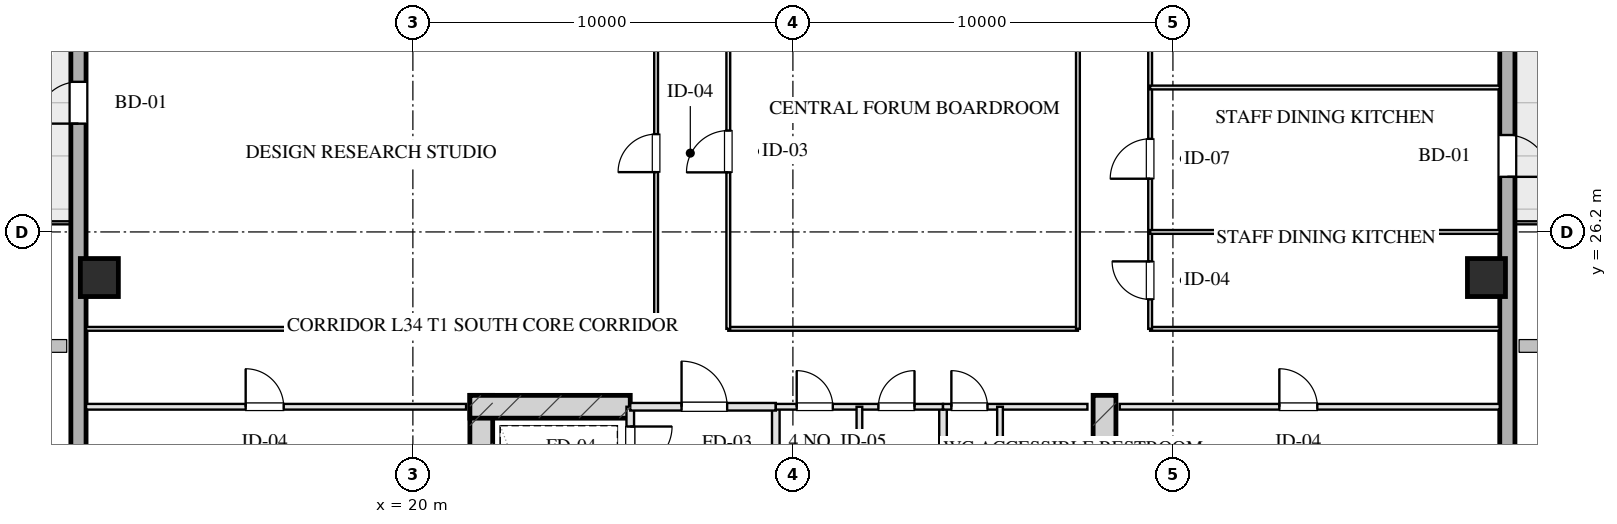
"""IFC4 building model, lengths in metres.
Left out: names, types, materials, properties, quantities, classifications, styles, units other than length and angle.
Written with IfcOpenShell. Run it as: python <this file> out.ifc"""

import sys

from ifc_helpers import new_model, si_unit, direction, frame, frame_2d, origin, origin_2d, place, context, subcontext, project, spatial, rectangle, hollow_rectangle, extrude, element, fill, save


model = new_model("IFC4")
c1 = context("Model", 3, precision=1e-05, world=origin(), true_north=direction((0.0, 1.0)))
c2 = subcontext(c1, "Body", "Model", "MODEL_VIEW")
j1 = project(units=[si_unit("LENGTHUNIT", "METRE"), si_unit("PLANEANGLEUNIT", "RADIAN")], contexts=[c1])
p1 = place(None, origin())
s1 = spatial("IfcSite", under=j1, at=p1, CompositionType="ELEMENT")
p2 = place(p1, origin())
s2 = spatial("IfcBuilding", under=s1, at=p2, CompositionType="ELEMENT")
p3 = place(p2, frame((0.0, 0.0, 131.1)))
s3 = spatial("IfcBuildingStorey", under=s2, at=p3, CompositionType="ELEMENT", Elevation=131.1)
for number, where, z_axis, x_axis in (
    (1, (21.8, 21.9, 0.0), (0.0, 0.0, 1.0), (0.0, -1.0, 0.0)),
    (2, (38.2, 21.9, 0.0), (0.0, 0.0, 1.0), (0.0, -1.0, 0.0)),
):
    element("IfcWall", number, at=place(p3, frame(where, z_axis=z_axis, x_axis=x_axis)), inside=s3, PredefinedType="SHEAR", context=c2, shape_type="SweptSolid", body=[
        extrude(rectangle(XDim=9.48, YDim=0.6, at=frame_2d((4.74, 0.0))), origin(), (0.0, 0.0, 1.0), 3.45),
    ])
p4 = place(p3, frame((21.5, 21.6, 0.0), z_axis=(0.0, 0.0, 1.0), x_axis=(1.0, 0.0, 0.0)))
e3 = element("IfcWall", 3, at=p4, inside=s3, PredefinedType="SHEAR", context=c2, shape_type="SweptSolid", body=[
    extrude(rectangle(XDim=4.22, YDim=0.6, at=frame_2d((2.11, 0.0))), origin(), (0.0, 0.0, 1.0), 3.45),
])
for number, where, z_axis, x_axis in (
    (4, (11.75, 25.0, 0.0), (0.0, 0.0, 1.0), (1.0, 0.0, 0.0)),
    (5, (48.25, 25.0, 0.0), (0.0, 0.0, 1.0), (1.0, 0.0, 0.0)),
):
    element("IfcColumn", number, at=place(p3, frame(where, z_axis=z_axis, x_axis=x_axis)), inside=s3, PredefinedType="COLUMN", context=c2, shape_type="SweptSolid", body=[
        extrude(hollow_rectangle(XDim=1.0, YDim=1.0, WallThickness=0.036, at=origin_2d()), origin(), (0.0, 0.0, 1.0), 3.451),
    ])
p5 = place(p3, frame((11.2, 9.0, 0.0), z_axis=(0.0, 0.0, 1.0), x_axis=(0.0, 1.0, 0.0)))
e6 = element("IfcWall", 6, at=p5, inside=s3, PredefinedType="SOLIDWALL", context=c2, shape_type="SweptSolid", body=[
    extrude(rectangle(XDim=50.0, YDim=0.4, at=frame_2d((25.0, 0.0))), origin(), (0.0, 0.0, 1.0), 2.61),
])
p6 = place(p5, frame((26.475, 0.0, 0.75)))
e7 = element("IfcOpeningElement", 7, at=p6, cuts=e6, PredefinedType="OPENING", context=c2, shape_type="SweptSolid", body=[
    extrude(rectangle(XDim=2.25, YDim=1.46, at=frame_2d((1.125, 0.73))), frame((0.0, 0.21, 0.0), z_axis=(0.0, -1.0, 0.0), x_axis=(1.0, 0.0, 0.0)), (0.0, 0.0, 1.0), 0.42),
])
p7 = place(p5, frame((30.275, 0.0, 0.75)))
e8 = element("IfcOpeningElement", 8, at=p7, cuts=e6, PredefinedType="OPENING", context=c2, shape_type="SweptSolid", body=[
    extrude(rectangle(XDim=2.25, YDim=1.46, at=frame_2d((1.125, 0.73))), frame((0.0, 0.21, 0.0), z_axis=(0.0, -1.0, 0.0), x_axis=(1.0, 0.0, 0.0)), (0.0, 0.0, 1.0), 0.42),
])
p8 = place(p5, frame((20.05, 0.0, 0.0)))
e9 = element("IfcOpeningElement", 9, at=p8, cuts=e6, PredefinedType="OPENING", context=c2, shape_type="SweptSolid", body=[
    extrude(rectangle(XDim=1.1, YDim=2.15, at=frame_2d((0.55, 1.075))), frame((0.0, 0.21, 0.0), z_axis=(0.0, -1.0, 0.0), x_axis=(1.0, 0.0, 0.0)), (0.0, 0.0, 1.0), 0.42),
])
p9 = place(p3, frame((48.8, 59.0, 0.0), z_axis=(0.0, 0.0, 1.0), x_axis=(0.0, -1.0, 0.0)))
e10 = element("IfcWall", 10, at=p9, inside=s3, PredefinedType="SOLIDWALL", context=c2, shape_type="SweptSolid", body=[
    extrude(rectangle(XDim=50.0, YDim=0.4, at=frame_2d((25.0, 0.0))), origin(), (0.0, 0.0, 1.0), 2.61),
])
p10 = place(p9, frame((21.275, 0.0, 0.75)))
e11 = element("IfcOpeningElement", 11, at=p10, cuts=e10, PredefinedType="OPENING", context=c2, shape_type="SweptSolid", body=[
    extrude(rectangle(XDim=2.25, YDim=1.46, at=frame_2d((1.125, 0.73))), frame((0.0, 0.21, 0.0), z_axis=(0.0, -1.0, 0.0), x_axis=(1.0, 0.0, 0.0)), (0.0, 0.0, 1.0), 0.42),
])
p11 = place(p9, frame((17.475, 0.0, 0.75)))
e12 = element("IfcOpeningElement", 12, at=p11, cuts=e10, PredefinedType="OPENING", context=c2, shape_type="SweptSolid", body=[
    extrude(rectangle(XDim=2.25, YDim=1.46, at=frame_2d((1.125, 0.73))), frame((0.0, 0.21, 0.0), z_axis=(0.0, -1.0, 0.0), x_axis=(1.0, 0.0, 0.0)), (0.0, 0.0, 1.0), 0.42),
])
p12 = place(p9, frame((30.25, 0.0, 0.0)))
e13 = element("IfcOpeningElement", 13, at=p12, cuts=e10, PredefinedType="OPENING", context=c2, shape_type="SweptSolid", body=[
    extrude(rectangle(XDim=1.1, YDim=2.15, at=frame_2d((0.55, 1.075))), frame((0.0, 0.21, 0.0), z_axis=(0.0, -1.0, 0.0), x_axis=(1.0, 0.0, 0.0)), (0.0, 0.0, 1.0), 0.42),
])
p13 = place(p3, frame((25.72, 21.6, 0.0), z_axis=(0.0, 0.0, 1.0), x_axis=(0.0, -1.0, 0.0)))
e14 = element("IfcWall", 14, at=p13, inside=s3, PredefinedType="PARTITIONING", context=c2, shape_type="SweptSolid", body=[
    extrude(rectangle(XDim=1.9, YDim=0.2, at=frame_2d((0.95, 0.0))), origin(), (0.0, 0.0, 1.0), 3.175),
])
p14 = place(p13, frame((0.52, 0.0, 0.0)))
e15 = element("IfcOpeningElement", 15, at=p14, cuts=e14, PredefinedType="OPENING", context=c2, shape_type="SweptSolid", body=[
    extrude(rectangle(XDim=1.1, YDim=2.05, at=frame_2d((0.55, 1.025))), frame((0.0, 0.11, 0.0), z_axis=(0.0, -1.0, 0.0), x_axis=(1.0, 0.0, 0.0)), (0.0, 0.0, 1.0), 0.22),
])
p15 = place(p3, frame((29.55, 21.6, 0.0), z_axis=(0.0, 0.0, 1.0), x_axis=(0.0, -1.0, 0.0)))
e16 = element("IfcWall", 16, at=p15, inside=s3, PredefinedType="PARTITIONING", context=c2, shape_type="SweptSolid", body=[
    extrude(rectangle(XDim=8.43, YDim=0.2, at=frame_2d((4.215, 0.0))), origin(), (0.0, 0.0, 1.0), 3.175),
])
p16 = place(p3, frame((25.72, 21.6, 0.0), z_axis=(0.0, 0.0, 1.0), x_axis=(1.0, 0.0, 0.0)))
e17 = element("IfcWall", 17, at=p16, inside=s3, PredefinedType="PARTITIONING", context=c2, shape_type="SweptSolid", body=[
    extrude(rectangle(XDim=3.83, YDim=0.2, at=frame_2d((1.915, 0.0))), origin(), (0.0, 0.0, 1.0), 3.175),
])
p17 = place(p16, frame((1.35, 0.0, 0.0)))
e18 = element("IfcOpeningElement", 18, at=p17, cuts=e17, PredefinedType="OPENING", context=c2, shape_type="SweptSolid", body=[
    extrude(rectangle(XDim=1.2, YDim=2.05, at=frame_2d((0.6, 1.025))), frame((0.0, 0.11, 0.0), z_axis=(0.0, -1.0, 0.0), x_axis=(1.0, 0.0, 0.0)), (0.0, 0.0, 1.0), 0.22),
])
p18 = place(p3, frame((33.95, 21.6, 0.0), z_axis=(0.0, 0.0, 1.0), x_axis=(0.0, -1.0, 0.0)))
e19 = element("IfcWall", 19, at=p18, inside=s3, PredefinedType="PARTITIONING", context=c2, shape_type="SweptSolid", body=[
    extrude(rectangle(XDim=8.43, YDim=0.2, at=frame_2d((4.215, 0.0))), origin(), (0.0, 0.0, 1.0), 3.175),
])
p19 = place(p3, frame((29.55, 21.6, 0.0), z_axis=(0.0, 0.0, 1.0), x_axis=(1.0, 0.0, 0.0)))
e20 = element("IfcWall", 20, at=p19, inside=s3, PredefinedType="PARTITIONING", context=c2, shape_type="SweptSolid", body=[
    extrude(rectangle(XDim=4.4, YDim=0.15, at=frame_2d((2.2, 0.0))), origin(), (0.0, 0.0, 1.0), 3.175),
])
p20 = place(p19, frame((0.55, 0.0, 0.0)))
e21 = element("IfcOpeningElement", 21, at=p20, cuts=e20, PredefinedType="OPENING", context=c2, shape_type="SweptSolid", body=[
    extrude(rectangle(XDim=0.95, YDim=2.05, at=frame_2d((0.475, 1.025))), frame((0.0, 0.085, 0.0), z_axis=(0.0, -1.0, 0.0), x_axis=(1.0, 0.0, 0.0)), (0.0, 0.0, 1.0), 0.17),
])
p21 = place(p19, frame((2.7, 0.0, 0.0)))
e22 = element("IfcOpeningElement", 22, at=p21, cuts=e20, PredefinedType="OPENING", context=c2, shape_type="SweptSolid", body=[
    extrude(rectangle(XDim=0.95, YDim=2.05, at=frame_2d((0.475, 1.025))), frame((0.0, 0.085, 0.0), z_axis=(0.0, -1.0, 0.0), x_axis=(1.0, 0.0, 0.0)), (0.0, 0.0, 1.0), 0.17),
])
p22 = place(p3, frame((31.75, 21.6, 0.0), z_axis=(0.0, 0.0, 1.0), x_axis=(0.0, -1.0, 0.0)))
e23 = element("IfcWall", 23, at=p22, inside=s3, PredefinedType="PARTITIONING", context=c2, shape_type="SweptSolid", body=[
    extrude(rectangle(XDim=8.43, YDim=0.15, at=frame_2d((4.215, 0.0))), origin(), (0.0, 0.0, 1.0), 3.175),
])
p23 = place(p3, frame((33.95, 21.6, 0.0), z_axis=(0.0, 0.0, 1.0), x_axis=(1.0, 0.0, 0.0)))
e24 = element("IfcWall", 24, at=p23, inside=s3, PredefinedType="PARTITIONING", context=c2, shape_type="SweptSolid", body=[
    extrude(rectangle(XDim=3.8, YDim=0.15, at=frame_2d((1.9, 0.0))), origin(), (0.0, 0.0, 1.0), 3.175),
])
p24 = place(p23, frame((0.22, 0.0, 0.0)))
e25 = element("IfcOpeningElement", 25, at=p24, cuts=e24, PredefinedType="OPENING", context=c2, shape_type="SweptSolid", body=[
    extrude(rectangle(XDim=0.95, YDim=2.05, at=frame_2d((0.475, 1.025))), frame((0.0, 0.085, 0.0), z_axis=(0.0, -1.0, 0.0), x_axis=(1.0, 0.0, 0.0)), (0.0, 0.0, 1.0), 0.17),
])
p25 = place(p3, frame((35.45, 21.6, 0.0), z_axis=(0.0, 0.0, 1.0), x_axis=(0.0, -1.0, 0.0)))
e26 = element("IfcWall", 26, at=p25, inside=s3, PredefinedType="PARTITIONING", context=c2, shape_type="SweptSolid", body=[
    extrude(rectangle(XDim=8.43, YDim=0.15, at=frame_2d((4.215, 0.0))), origin(), (0.0, 0.0, 1.0), 2.765),
])
p26 = place(p25, frame((2.55, 0.0, 0.0)))
e27 = element("IfcOpeningElement", 27, at=p26, cuts=e26, PredefinedType="OPENING", context=c2, shape_type="SweptSolid", body=[
    extrude(rectangle(XDim=0.95, YDim=2.05, at=frame_2d((0.475, 1.025))), frame((0.0, 0.085, 0.0), z_axis=(0.0, -1.0, 0.0), x_axis=(1.0, 0.0, 0.0)), (0.0, 0.0, 1.0), 0.17),
])
p27 = place(p25, frame((5.8, 0.0, 0.0)))
e28 = element("IfcOpeningElement", 28, at=p27, cuts=e26, PredefinedType="OPENING", context=c2, shape_type="SweptSolid", body=[
    extrude(rectangle(XDim=0.9, YDim=2.05, at=frame_2d((0.45, 1.025))), frame((0.0, 0.085, 0.0), z_axis=(0.0, -1.0, 0.0), x_axis=(1.0, 0.0, 0.0)), (0.0, 0.0, 1.0), 0.17),
])
p28 = place(p3, frame((11.4, 21.6, 0.0), z_axis=(0.0, 0.0, 1.0), x_axis=(1.0, 0.0, 0.0)))
e29 = element("IfcWall", 29, at=p28, inside=s3, PredefinedType="PARTITIONING", context=c2, shape_type="SweptSolid", body=[
    extrude(rectangle(XDim=10.0, YDim=0.15, at=frame_2d((5.0, 0.0))), origin(), (0.0, 0.0, 1.0), 3.175),
])
p29 = place(p28, frame((4.2, 0.0, 0.0)))
e30 = element("IfcOpeningElement", 30, at=p29, cuts=e29, PredefinedType="OPENING", context=c2, shape_type="SweptSolid", body=[
    extrude(rectangle(XDim=1.0, YDim=2.05, at=frame_2d((0.5, 1.025))), frame((0.0, 0.085, 0.0), z_axis=(0.0, -1.0, 0.0), x_axis=(1.0, 0.0, 0.0)), (0.0, 0.0, 1.0), 0.17),
])
p30 = place(p3, frame((38.6, 21.6, 0.0), z_axis=(0.0, 0.0, 1.0), x_axis=(1.0, 0.0, 0.0)))
e31 = element("IfcWall", 31, at=p30, inside=s3, PredefinedType="PARTITIONING", context=c2, shape_type="SweptSolid", body=[
    extrude(rectangle(XDim=10.0, YDim=0.15, at=frame_2d((5.0, 0.0))), origin(), (0.0, 0.0, 1.0), 3.175),
])
p31 = place(p30, frame((4.2, 0.0, 0.0)))
e32 = element("IfcOpeningElement", 32, at=p31, cuts=e31, PredefinedType="OPENING", context=c2, shape_type="SweptSolid", body=[
    extrude(rectangle(XDim=1.0, YDim=2.05, at=frame_2d((0.5, 1.025))), frame((0.0, 0.085, 0.0), z_axis=(0.0, -1.0, 0.0), x_axis=(1.0, 0.0, 0.0)), (0.0, 0.0, 1.0), 0.17),
])
p32 = place(p3, frame((11.4, 23.65, 0.0), z_axis=(0.0, 0.0, 1.0), x_axis=(1.0, 0.0, 0.0)))
e33 = element("IfcWall", 33, at=p32, inside=s3, PredefinedType="MOVABLE", context=c2, shape_type="SweptSolid", body=[
    extrude(rectangle(XDim=15.0, YDim=0.1, at=frame_2d((7.5, 0.0))), origin(), (0.0, 0.0, 1.0), 3.175),
])
p33 = place(p3, frame((28.3, 23.65, 0.0), z_axis=(0.0, 0.0, 1.0), x_axis=(1.0, 0.0, 0.0)))
e34 = element("IfcWall", 34, at=p33, inside=s3, PredefinedType="MOVABLE", context=c2, shape_type="SweptSolid", body=[
    extrude(rectangle(XDim=9.2, YDim=0.1, at=frame_2d((4.6, 0.0))), origin(), (0.0, 0.0, 1.0), 3.175),
])
p34 = place(p3, frame((39.4, 23.65, 0.0), z_axis=(0.0, 0.0, 1.0), x_axis=(1.0, 0.0, 0.0)))
e35 = element("IfcWall", 35, at=p34, inside=s3, PredefinedType="MOVABLE", context=c2, shape_type="SweptSolid", body=[
    extrude(rectangle(XDim=9.2, YDim=0.1, at=frame_2d((4.6, 0.0))), origin(), (0.0, 0.0, 1.0), 3.175),
])
p35 = place(p3, frame((26.4, 23.65, 0.0), z_axis=(0.0, 0.0, 1.0), x_axis=(0.0, 1.0, 0.0)))
e36 = element("IfcWall", 36, at=p35, inside=s3, PredefinedType="MOVABLE", context=c2, shape_type="SweptSolid", body=[
    extrude(rectangle(XDim=20.7, YDim=0.1, at=frame_2d((10.35, 0.0))), origin(), (0.0, 0.0, 1.0), 3.175),
])
p36 = place(p35, frame((4.124, 0.0, 0.0)))
e37 = element("IfcOpeningElement", 37, at=p36, cuts=e36, PredefinedType="OPENING", context=c2, shape_type="SweptSolid", body=[
    extrude(rectangle(XDim=1.0, YDim=2.05, at=frame_2d((0.5, 1.025))), frame((0.0, 0.06, 0.0), z_axis=(0.0, -1.0, 0.0), x_axis=(1.0, 0.0, 0.0)), (0.0, 0.0, 1.0), 0.12),
])
p37 = place(p35, frame((14.473, 0.0, 0.0)))
e38 = element("IfcOpeningElement", 38, at=p37, cuts=e36, PredefinedType="OPENING", context=c2, shape_type="SweptSolid", body=[
    extrude(rectangle(XDim=1.0, YDim=2.05, at=frame_2d((0.5, 1.025))), frame((0.0, 0.06, 0.0), z_axis=(0.0, -1.0, 0.0), x_axis=(1.0, 0.0, 0.0)), (0.0, 0.0, 1.0), 0.12),
])
p38 = place(p3, frame((28.3, 23.65, 0.0), z_axis=(0.0, 0.0, 1.0), x_axis=(0.0, 1.0, 0.0)))
e39 = element("IfcWall", 39, at=p38, inside=s3, PredefinedType="MOVABLE", context=c2, shape_type="SweptSolid", body=[
    extrude(rectangle(XDim=20.7, YDim=0.1, at=frame_2d((10.35, 0.0))), origin(), (0.0, 0.0, 1.0), 3.175),
])
p39 = place(p38, frame((4.117, 0.0, 0.0)))
e40 = element("IfcOpeningElement", 40, at=p39, cuts=e39, PredefinedType="OPENING", context=c2, shape_type="SweptSolid", body=[
    extrude(rectangle(XDim=1.1, YDim=2.05, at=frame_2d((0.55, 1.025))), frame((0.0, 0.06, 0.0), z_axis=(0.0, -1.0, 0.0), x_axis=(1.0, 0.0, 0.0)), (0.0, 0.0, 1.0), 0.12),
])
p40 = place(p38, frame((14.347, 0.0, 0.0)))
e41 = element("IfcOpeningElement", 41, at=p40, cuts=e39, PredefinedType="OPENING", context=c2, shape_type="SweptSolid", body=[
    extrude(rectangle(XDim=1.1, YDim=2.05, at=frame_2d((0.55, 1.025))), frame((0.0, 0.06, 0.0), z_axis=(0.0, -1.0, 0.0), x_axis=(1.0, 0.0, 0.0)), (0.0, 0.0, 1.0), 0.12),
])
p41 = place(p3, frame((37.5, 23.65, 0.0), z_axis=(0.0, 0.0, 1.0), x_axis=(0.0, 1.0, 0.0)))
e42 = element("IfcWall", 42, at=p41, inside=s3, PredefinedType="MOVABLE", context=c2, shape_type="SweptSolid", body=[
    extrude(rectangle(XDim=20.7, YDim=0.1, at=frame_2d((10.35, 0.0))), origin(), (0.0, 0.0, 1.0), 3.175),
])
p42 = place(p3, frame((39.4, 23.65, 0.0), z_axis=(0.0, 0.0, 1.0), x_axis=(0.0, 1.0, 0.0)))
e43 = element("IfcWall", 43, at=p42, inside=s3, PredefinedType="MOVABLE", context=c2, shape_type="SweptSolid", body=[
    extrude(rectangle(XDim=20.7, YDim=0.1, at=frame_2d((10.35, 0.0))), origin(), (0.0, 0.0, 1.0), 3.175),
])
p43 = place(p42, frame((0.775, 0.0, 0.0)))
e44 = element("IfcOpeningElement", 44, at=p43, cuts=e43, PredefinedType="OPENING", context=c2, shape_type="SweptSolid", body=[
    extrude(rectangle(XDim=1.0, YDim=2.05, at=frame_2d((0.5, 1.025))), frame((0.0, 0.06, 0.0), z_axis=(0.0, -1.0, 0.0), x_axis=(1.0, 0.0, 0.0)), (0.0, 0.0, 1.0), 0.12),
])
p44 = place(p42, frame((3.95, 0.0, 0.0)))
e45 = element("IfcOpeningElement", 45, at=p44, cuts=e43, PredefinedType="OPENING", context=c2, shape_type="SweptSolid", body=[
    extrude(rectangle(XDim=1.05, YDim=2.05, at=frame_2d((0.525, 1.025))), frame((0.0, 0.06, 0.0), z_axis=(0.0, -1.0, 0.0), x_axis=(1.0, 0.0, 0.0)), (0.0, 0.0, 1.0), 0.12),
])
p45 = place(p42, frame((8.298, 0.0, 0.0)))
e46 = element("IfcOpeningElement", 46, at=p45, cuts=e43, PredefinedType="OPENING", context=c2, shape_type="SweptSolid", body=[
    extrude(rectangle(XDim=0.85, YDim=2.05, at=frame_2d((0.425, 1.025))), frame((0.0, 0.06, 0.0), z_axis=(0.0, -1.0, 0.0), x_axis=(1.0, 0.0, 0.0)), (0.0, 0.0, 1.0), 0.12),
])
p46 = place(p42, frame((12.712, 0.0, 0.0)))
e47 = element("IfcOpeningElement", 47, at=p46, cuts=e43, PredefinedType="OPENING", context=c2, shape_type="SweptSolid", body=[
    extrude(rectangle(XDim=1.0, YDim=2.05, at=frame_2d((0.5, 1.025))), frame((0.0, 0.06, 0.0), z_axis=(0.0, -1.0, 0.0), x_axis=(1.0, 0.0, 0.0)), (0.0, 0.0, 1.0), 0.12),
])
p47 = place(p42, frame((16.231, 0.0, 0.0)))
e48 = element("IfcOpeningElement", 48, at=p47, cuts=e43, PredefinedType="OPENING", context=c2, shape_type="SweptSolid", body=[
    extrude(rectangle(XDim=1.0, YDim=2.05, at=frame_2d((0.5, 1.025))), frame((0.0, 0.06, 0.0), z_axis=(0.0, -1.0, 0.0), x_axis=(1.0, 0.0, 0.0)), (0.0, 0.0, 1.0), 0.12),
])
p48 = place(p42, frame((18.992, 0.0, 0.0)))
e49 = element("IfcOpeningElement", 49, at=p48, cuts=e43, PredefinedType="OPENING", context=c2, shape_type="SweptSolid", body=[
    extrude(rectangle(XDim=1.0, YDim=2.05, at=frame_2d((0.5, 1.025))), frame((0.0, 0.06, 0.0), z_axis=(0.0, -1.0, 0.0), x_axis=(1.0, 0.0, 0.0)), (0.0, 0.0, 1.0), 0.12),
])
for number, where, z_axis, x_axis in (
    (50, (39.4, 26.2, 0.0), (0.0, 0.0, 1.0), (1.0, 0.0, 0.0)),
    (51, (39.4, 30.0, 0.0), (0.0, 0.0, 1.0), (1.0, 0.0, 0.0)),
):
    element("IfcWall", number, at=place(p3, frame(where, z_axis=z_axis, x_axis=x_axis)), inside=s3, PredefinedType="MOVABLE", context=c2, shape_type="SweptSolid", body=[
        extrude(rectangle(XDim=9.2, YDim=0.1, at=frame_2d((4.6, 0.0))), origin(), (0.0, 0.0, 1.0), 3.175),
    ])
p49 = place(p8, origin())
e52 = element("IfcDoor", 52, at=p49, inside=s3, OperationType="SINGLE_SWING_LEFT", PredefinedType="DOOR", context=c2, shape_type="SweptSolid", body=[
    extrude(rectangle(XDim=1.1, YDim=2.15, at=frame_2d((0.55, 1.075))), frame((0.0, 0.025, 0.0), z_axis=(0.0, -1.0, 0.0), x_axis=(1.0, 0.0, 0.0)), (0.0, 0.0, 1.0), 0.05),
])
fill(e9, e52)
p50 = place(p12, origin())
e53 = element("IfcDoor", 53, at=p50, inside=s3, OperationType="SINGLE_SWING_RIGHT", PredefinedType="DOOR", context=c2, shape_type="SweptSolid", body=[
    extrude(rectangle(XDim=1.1, YDim=2.15, at=frame_2d((0.55, 1.075))), frame((0.0, 0.025, 0.0), z_axis=(0.0, -1.0, 0.0), x_axis=(1.0, 0.0, 0.0)), (0.0, 0.0, 1.0), 0.05),
])
fill(e13, e53)
p51 = place(p14, origin())
e54 = element("IfcDoor", 54, at=p51, inside=s3, OperationType="SINGLE_SWING_LEFT", PredefinedType="DOOR", context=c2, shape_type="SweptSolid", body=[
    extrude(rectangle(XDim=1.1, YDim=2.05, at=frame_2d((0.55, 1.025))), frame((0.0, 0.025, 0.0), z_axis=(0.0, -1.0, 0.0), x_axis=(1.0, 0.0, 0.0)), (0.0, 0.0, 1.0), 0.05),
])
fill(e15, e54)
p52 = place(p17, origin())
e55 = element("IfcDoor", 55, at=p52, inside=s3, OperationType="SINGLE_SWING_LEFT", PredefinedType="DOOR", context=c2, shape_type="SweptSolid", body=[
    extrude(rectangle(XDim=1.2, YDim=2.05, at=frame_2d((0.6, 1.025))), frame((0.0, 0.025, 0.0), z_axis=(0.0, -1.0, 0.0), x_axis=(1.0, 0.0, 0.0)), (0.0, 0.0, 1.0), 0.05),
])
fill(e18, e55)
p53 = place(p20, origin())
e56 = element("IfcDoor", 56, at=p53, inside=s3, OperationType="SINGLE_SWING_LEFT", PredefinedType="DOOR", context=c2, shape_type="SweptSolid", body=[
    extrude(rectangle(XDim=0.95, YDim=2.05, at=frame_2d((0.475, 1.025))), frame((0.0, 0.025, 0.0), z_axis=(0.0, -1.0, 0.0), x_axis=(1.0, 0.0, 0.0)), (0.0, 0.0, 1.0), 0.05),
])
fill(e21, e56)
p54 = place(p21, origin())
e57 = element("IfcDoor", 57, at=p54, inside=s3, OperationType="SINGLE_SWING_RIGHT", PredefinedType="DOOR", context=c2, shape_type="SweptSolid", body=[
    extrude(rectangle(XDim=0.95, YDim=2.05, at=frame_2d((0.475, 1.025))), frame((0.0, 0.025, 0.0), z_axis=(0.0, -1.0, 0.0), x_axis=(1.0, 0.0, 0.0)), (0.0, 0.0, 1.0), 0.05),
])
fill(e22, e57)
p55 = place(p24, origin())
e58 = element("IfcDoor", 58, at=p55, inside=s3, OperationType="SINGLE_SWING_LEFT", PredefinedType="DOOR", context=c2, shape_type="SweptSolid", body=[
    extrude(rectangle(XDim=0.95, YDim=2.05, at=frame_2d((0.475, 1.025))), frame((0.0, 0.025, 0.0), z_axis=(0.0, -1.0, 0.0), x_axis=(1.0, 0.0, 0.0)), (0.0, 0.0, 1.0), 0.05),
])
fill(e25, e58)
p56 = place(p29, origin())
e59 = element("IfcDoor", 59, at=p56, inside=s3, OperationType="SINGLE_SWING_LEFT", PredefinedType="DOOR", context=c2, shape_type="SweptSolid", body=[
    extrude(rectangle(XDim=1.0, YDim=2.05, at=frame_2d((0.5, 1.025))), frame((0.0, 0.025, 0.0), z_axis=(0.0, -1.0, 0.0), x_axis=(1.0, 0.0, 0.0)), (0.0, 0.0, 1.0), 0.05),
])
fill(e30, e59)
p57 = place(p31, origin())
e60 = element("IfcDoor", 60, at=p57, inside=s3, OperationType="SINGLE_SWING_LEFT", PredefinedType="DOOR", context=c2, shape_type="SweptSolid", body=[
    extrude(rectangle(XDim=1.0, YDim=2.05, at=frame_2d((0.5, 1.025))), frame((0.0, 0.025, 0.0), z_axis=(0.0, -1.0, 0.0), x_axis=(1.0, 0.0, 0.0)), (0.0, 0.0, 1.0), 0.05),
])
fill(e32, e60)
p58 = place(p36, origin())
e61 = element("IfcDoor", 61, at=p58, inside=s3, OperationType="SINGLE_SWING_LEFT", PredefinedType="DOOR", context=c2, shape_type="SweptSolid", body=[
    extrude(rectangle(XDim=1.0, YDim=2.05, at=frame_2d((0.5, 1.025))), frame((0.0, 0.025, 0.0), z_axis=(0.0, -1.0, 0.0), x_axis=(1.0, 0.0, 0.0)), (0.0, 0.0, 1.0), 0.05),
])
fill(e37, e61)
p59 = place(p39, origin())
e62 = element("IfcDoor", 62, at=p59, inside=s3, OperationType="SINGLE_SWING_LEFT", PredefinedType="DOOR", context=c2, shape_type="SweptSolid", body=[
    extrude(rectangle(XDim=1.1, YDim=2.05, at=frame_2d((0.55, 1.025))), frame((0.0, 0.025, 0.0), z_axis=(0.0, -1.0, 0.0), x_axis=(1.0, 0.0, 0.0)), (0.0, 0.0, 1.0), 0.05),
])
fill(e40, e62)
p60 = place(p43, origin())
e63 = element("IfcDoor", 63, at=p60, inside=s3, OperationType="SINGLE_SWING_RIGHT", PredefinedType="DOOR", context=c2, shape_type="SweptSolid", body=[
    extrude(rectangle(XDim=1.0, YDim=2.05, at=frame_2d((0.5, 1.025))), frame((0.0, 0.025, 0.0), z_axis=(0.0, -1.0, 0.0), x_axis=(1.0, 0.0, 0.0)), (0.0, 0.0, 1.0), 0.05),
])
fill(e44, e63)
p61 = place(p44, origin())
e64 = element("IfcDoor", 64, at=p61, inside=s3, OperationType="SINGLE_SWING_LEFT", PredefinedType="DOOR", context=c2, shape_type="SweptSolid", body=[
    extrude(rectangle(XDim=1.05, YDim=2.05, at=frame_2d((0.525, 1.025))), frame((0.0, 0.025, 0.0), z_axis=(0.0, -1.0, 0.0), x_axis=(1.0, 0.0, 0.0)), (0.0, 0.0, 1.0), 0.05),
])
fill(e45, e64)
save(model, sys.argv[1])
